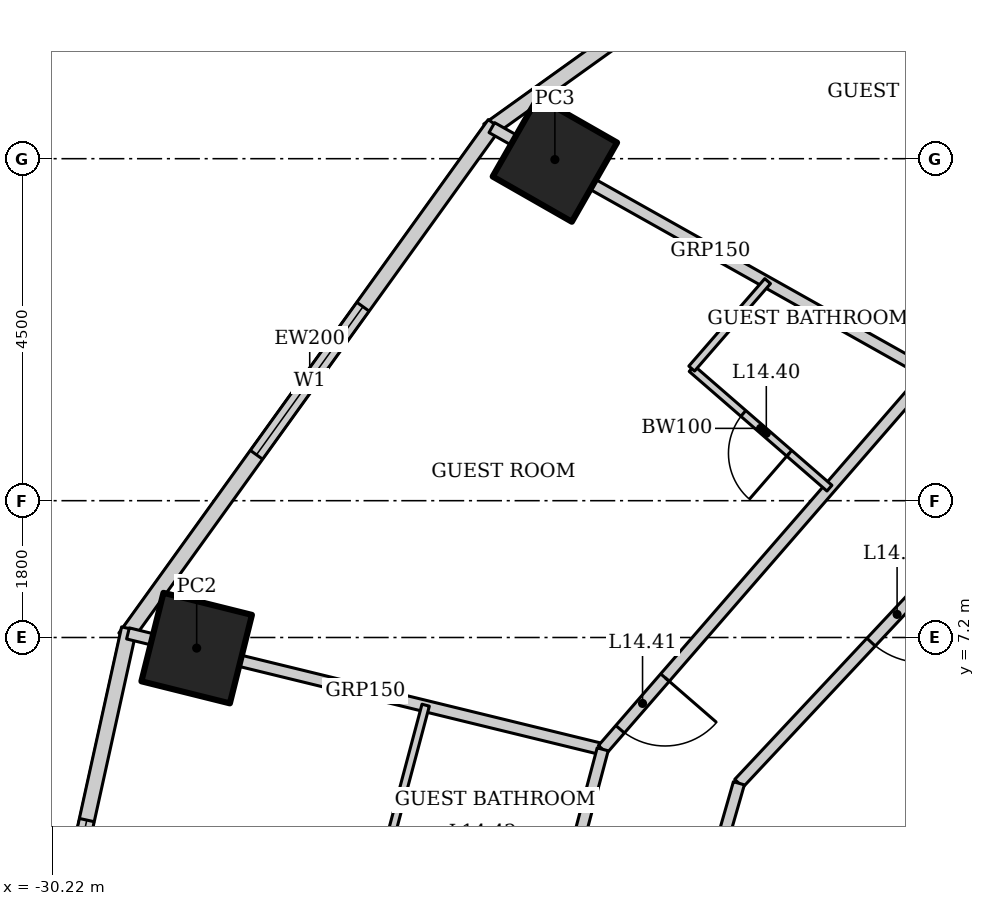
"""IFC4 building model, lengths in metres.
Left out: names, types, materials, properties, quantities, classifications, styles, units other than length and angle.
Written with IfcOpenShell. Run it as: python <this file> out.ifc"""

import sys

from ifc_helpers import new_model, si_unit, direction, frame, frame_2d, origin, origin_2d, place, context, subcontext, project, spatial, rectangle, hollow_rectangle, extrude, element, fill, save


model = new_model("IFC4")
c1 = context("Model", 3, precision=1e-05, world=origin(), true_north=direction((0.0, 1.0)))
c2 = subcontext(c1, "Body", "Model", "MODEL_VIEW")
j1 = project(units=[si_unit("LENGTHUNIT", "METRE"), si_unit("PLANEANGLEUNIT", "RADIAN")], contexts=[c1])
p1 = place(None, origin())
s1 = spatial("IfcSite", under=j1, at=p1, CompositionType="ELEMENT")
p2 = place(p1, origin())
s2 = spatial("IfcBuilding", under=s1, at=p2, CompositionType="ELEMENT")
p3 = place(p2, frame((0.0, 0.0, 65.8)))
s3 = spatial("IfcBuildingStorey", under=s2, at=p3, CompositionType="ELEMENT", Elevation=65.8)
p4 = place(p3, frame((-23.605, 13.489, 0.0), z_axis=(0.0, 0.0, 1.0), x_axis=(0.496139221777, 0.86824298017, 0.0)))
e1 = element("IfcColumn", 1, at=p4, inside=s3, PredefinedType="COLUMN", context=c2, shape_type="SweptSolid", body=[
    extrude(hollow_rectangle(XDim=1.2, YDim=1.2, WallThickness=0.12, at=origin_2d()), origin(), (0.0, 0.0, 1.0), 3.6),
])
p5 = place(p3, frame((-28.318, 7.06, 0.0), z_axis=(0.0, 0.0, 1.0), x_axis=(0.2419218956, 0.970295726276, 0.0)))
e2 = element("IfcColumn", 2, at=p5, inside=s3, PredefinedType="COLUMN", context=c2, shape_type="SweptSolid", body=[
    extrude(hollow_rectangle(XDim=1.2, YDim=1.2, WallThickness=0.1, at=origin_2d()), origin(), (0.0, 0.0, 1.0), 3.6),
])
p6 = place(p3, frame((-17.929, 18.572, 0.0), z_axis=(0.0, 0.0, 1.0), x_axis=(-0.812791321576, -0.582554948112, 0.0)))
e3 = element("IfcWall", 3, at=p6, inside=s3, PredefinedType="SOLIDWALL", context=c2, shape_type="SweptSolid", body=[
    extrude(rectangle(XDim=8.063, YDim=0.2, at=frame_2d((4.032, 0.0))), origin(), (0.0, 0.0, 1.0), 3.4),
])
p7 = place(p6, frame((2.832, 0.0, 0.5)))
e4 = element("IfcOpeningElement", 4, at=p7, cuts=e3, PredefinedType="OPENING", context=c2, shape_type="SweptSolid", body=[
    extrude(rectangle(XDim=2.4, YDim=2.2, at=frame_2d((1.2, 1.1))), frame((0.0, 0.11, 0.0), z_axis=(0.0, -1.0, 0.0), x_axis=(1.0, 0.0, 0.0)), (0.0, 0.0, 1.0), 0.22),
])
p8 = place(p3, frame((-24.4, 13.957, 0.0), z_axis=(0.0, 0.0, 1.0), x_axis=(-0.583937613703, -0.811798536155, 0.0)))
e5 = element("IfcWall", 5, at=p8, inside=s3, PredefinedType="SOLIDWALL", context=c2, shape_type="SweptSolid", body=[
    extrude(rectangle(XDim=8.323, YDim=0.2, at=frame_2d((4.162, 0.0))), origin(), (0.0, 0.0, 1.0), 3.4),
])
p9 = place(p8, frame((2.961, 0.0, 0.5)))
e6 = element("IfcOpeningElement", 6, at=p9, cuts=e5, PredefinedType="OPENING", context=c2, shape_type="SweptSolid", body=[
    extrude(rectangle(XDim=2.4, YDim=2.2, at=frame_2d((1.2, 1.1))), frame((0.0, 0.11, 0.0), z_axis=(0.0, -1.0, 0.0), x_axis=(1.0, 0.0, 0.0)), (0.0, 0.0, 1.0), 0.22),
])
p10 = place(p3, frame((-29.208, 7.318, 0.0), z_axis=(0.0, 0.0, 1.0), x_axis=(-0.215238065514, -0.976561608478, 0.0)))
e7 = element("IfcWall", 7, at=p10, inside=s3, PredefinedType="SOLIDWALL", context=c2, shape_type="SweptSolid", body=[
    extrude(rectangle(XDim=7.562, YDim=0.2, at=frame_2d((3.781, 0.0))), origin(), (0.0, 0.0, 1.0), 3.4),
])
p11 = place(p10, frame((2.581, 0.0, 0.5)))
e8 = element("IfcOpeningElement", 8, at=p11, cuts=e7, PredefinedType="OPENING", context=c2, shape_type="SweptSolid", body=[
    extrude(rectangle(XDim=2.4, YDim=2.2, at=frame_2d((1.2, 1.1))), frame((0.0, 0.11, 0.0), z_axis=(0.0, -1.0, 0.0), x_axis=(1.0, 0.0, 0.0)), (0.0, 0.0, 1.0), 0.22),
])
p12 = place(p3, frame((-24.435, 13.909, 0.0), z_axis=(0.0, 0.0, 1.0), x_axis=(0.871747379892, -0.489955616001, 0.0)))
e9 = element("IfcWall", 9, at=p12, inside=s3, PredefinedType="PARTITIONING", context=c2, shape_type="SweptSolid", body=[
    extrude(rectangle(XDim=6.6, YDim=0.15, at=frame_2d((3.3, 0.0))), origin(), (0.0, 0.0, 1.0), 2.693),
])
p13 = place(p3, frame((-29.222, 7.254, 0.0), z_axis=(0.0, 0.0, 1.0), x_axis=(0.971456980633, -0.237215797913, 0.0)))
e10 = element("IfcWall", 10, at=p13, inside=s3, PredefinedType="PARTITIONING", context=c2, shape_type="SweptSolid", body=[
    extrude(rectangle(XDim=6.429, YDim=0.15, at=frame_2d((3.215, 0.0))), origin(), (0.0, 0.0, 1.0), 2.332),
])
p14 = place(p3, frame((-18.681, 10.675, 0.0), z_axis=(0.0, 0.0, 1.0), x_axis=(-0.655599989166, -0.755108372491, 0.0)))
e11 = element("IfcWall", 11, at=p14, inside=s3, PredefinedType="PARTITIONING", context=c2, shape_type="SweptSolid", body=[
    extrude(rectangle(XDim=6.551, YDim=0.15, at=frame_2d((3.275, 0.0))), origin(), (0.0, 0.0, 1.0), 3.45),
])
p15 = place(p14, frame((5.301, 0.0, 0.0)))
e12 = element("IfcOpeningElement", 12, at=p15, cuts=e11, PredefinedType="OPENING", context=c2, shape_type="SweptSolid", body=[
    extrude(rectangle(XDim=0.9, YDim=2.1, at=frame_2d((0.45, 1.05))), frame((0.0, 0.085, 0.0), z_axis=(0.0, -1.0, 0.0), x_axis=(1.0, 0.0, 0.0)), (0.0, 0.0, 1.0), 0.17),
])
p16 = place(p3, frame((-22.976, 5.729, 0.0), z_axis=(0.0, 0.0, 1.0), x_axis=(-0.257083265334, -0.966389256296, 0.0)))
e13 = element("IfcWall", 13, at=p16, inside=s3, PredefinedType="PARTITIONING", context=c2, shape_type="SweptSolid", body=[
    extrude(rectangle(XDim=5.928, YDim=0.15, at=frame_2d((2.964, 0.0))), origin(), (0.0, 0.0, 1.0), 3.45),
])
p17 = place(p16, frame((4.023, 0.0, 0.0)))
e14 = element("IfcOpeningElement", 14, at=p17, cuts=e13, PredefinedType="OPENING", context=c2, shape_type="SweptSolid", body=[
    extrude(rectangle(XDim=0.9, YDim=2.1, at=frame_2d((0.45, 1.05))), frame((0.0, 0.085, 0.0), z_axis=(0.0, -1.0, 0.0), x_axis=(1.0, 0.0, 0.0)), (0.0, 0.0, 1.0), 0.17),
])
p18 = place(p3, frame((-17.021, 9.726, 0.0), z_axis=(0.0, 0.0, 1.0), x_axis=(-0.68365836236, -0.729802194828, 0.0)))
e15 = element("IfcWall", 15, at=p18, inside=s3, PredefinedType="PARTITIONING", context=c2, shape_type="SweptSolid", body=[
    extrude(rectangle(XDim=6.09, YDim=0.15, at=frame_2d((3.045, 0.0))), origin(), (0.0, 0.0, 1.0), 3.45),
])
p19 = place(p18, frame((2.545, 0.0, 0.0)))
e16 = element("IfcOpeningElement", 16, at=p19, cuts=e15, PredefinedType="OPENING", context=c2, shape_type="SweptSolid", body=[
    extrude(rectangle(XDim=1.0, YDim=2.1, at=frame_2d((0.5, 1.05))), frame((0.0, 0.085, 0.0), z_axis=(0.0, -1.0, 0.0), x_axis=(1.0, 0.0, 0.0)), (0.0, 0.0, 1.0), 0.17),
])
p20 = place(p3, frame((-21.184, 5.282, 0.0), z_axis=(0.0, 0.0, 1.0), x_axis=(-0.27585972825, -0.961197903831, 0.0)))
e17 = element("IfcWall", 17, at=p20, inside=s3, PredefinedType="PARTITIONING", context=c2, shape_type="SweptSolid", body=[
    extrude(rectangle(XDim=4.559, YDim=0.15, at=frame_2d((2.279, 0.0))), origin(), (0.0, 0.0, 1.0), 3.45),
])
p21 = place(p3, frame((-19.993, 9.165, 0.0), z_axis=(0.0, 0.0, 1.0), x_axis=(-0.755098052661, 0.655611875172, 0.0)))
e18 = element("IfcWall", 18, at=p21, inside=s3, PredefinedType="PARTITIONING", context=c2, shape_type="SweptSolid", body=[
    extrude(rectangle(XDim=2.4, YDim=0.1, at=frame_2d((1.2, 0.0))), origin(), (0.0, 0.0, 1.0), 3.45),
])
p22 = place(p21, frame((0.7, 0.0, 0.0)))
e19 = element("IfcOpeningElement", 19, at=p22, cuts=e18, PredefinedType="OPENING", context=c2, shape_type="SweptSolid", body=[
    extrude(rectangle(XDim=0.8, YDim=2.1, at=frame_2d((0.4, 1.05))), frame((0.0, 0.06, 0.0), z_axis=(0.0, -1.0, 0.0), x_axis=(1.0, 0.0, 0.0)), (0.0, 0.0, 1.0), 0.12),
])
p23 = place(p3, frame((-21.805, 10.738, 0.0), z_axis=(0.0, 0.0, 1.0), x_axis=(0.655528024617, 0.755170847518, 0.0)))
e20 = element("IfcWall", 20, at=p23, inside=s3, PredefinedType="PARTITIONING", context=c2, shape_type="SweptSolid", body=[
    extrude(rectangle(XDim=1.524, YDim=0.1, at=frame_2d((0.762, 0.0))), origin(), (0.0, 0.0, 1.0), 3.45),
])
p24 = place(p3, frame((-25.81, 4.413, 0.0), z_axis=(0.0, 0.0, 1.0), x_axis=(0.257143831715, 0.96637314212, 0.0)))
e21 = element("IfcWall", 21, at=p24, inside=s3, PredefinedType="PARTITIONING", context=c2, shape_type="SweptSolid", body=[
    extrude(rectangle(XDim=1.962, YDim=0.1, at=frame_2d((0.981, 0.0))), origin(), (0.0, 0.0, 1.0), 3.45),
])
p25 = place(p9, origin())
e22 = element("IfcWindow", 22, at=p25, inside=s3, PartitioningType="SINGLE_PANEL", PredefinedType="WINDOW", context=c2, shape_type="SweptSolid", body=[
    extrude(rectangle(XDim=2.4, YDim=2.2, at=frame_2d((1.2, 1.1))), frame((0.0, 0.03, 0.0), z_axis=(0.0, -1.0, 0.0), x_axis=(1.0, 0.0, 0.0)), (0.0, 0.0, 1.0), 0.06),
])
fill(e6, e22)
p26 = place(p11, origin())
e23 = element("IfcWindow", 23, at=p26, inside=s3, PartitioningType="SINGLE_PANEL", PredefinedType="WINDOW", context=c2, shape_type="SweptSolid", body=[
    extrude(rectangle(XDim=2.4, YDim=2.2, at=frame_2d((1.2, 1.1))), frame((0.0, 0.03, 0.0), z_axis=(0.0, -1.0, 0.0), x_axis=(1.0, 0.0, 0.0)), (0.0, 0.0, 1.0), 0.06),
])
fill(e8, e23)
p27 = place(p19, origin())
e24 = element("IfcDoor", 24, at=p27, inside=s3, OperationType="SINGLE_SWING_LEFT", PredefinedType="DOOR", context=c2, shape_type="SweptSolid", body=[
    extrude(rectangle(XDim=1.0, YDim=2.1, at=frame_2d((0.5, 1.05))), frame((0.0, 0.025, 0.0), z_axis=(0.0, -1.0, 0.0), x_axis=(1.0, 0.0, 0.0)), (0.0, 0.0, 1.0), 0.05),
])
fill(e16, e24)
p28 = place(p22, origin())
e25 = element("IfcDoor", 25, at=p28, inside=s3, OperationType="SINGLE_SWING_LEFT", PredefinedType="DOOR", context=c2, shape_type="SweptSolid", body=[
    extrude(rectangle(XDim=0.8, YDim=2.1, at=frame_2d((0.4, 1.05))), frame((0.0, 0.025, 0.0), z_axis=(0.0, -1.0, 0.0), x_axis=(1.0, 0.0, 0.0)), (0.0, 0.0, 1.0), 0.05),
])
fill(e19, e25)
p29 = place(p15, origin())
e26 = element("IfcDoor", 26, at=p29, inside=s3, OperationType="SINGLE_SWING_LEFT", PredefinedType="DOOR", context=c2, shape_type="SweptSolid", body=[
    extrude(rectangle(XDim=0.9, YDim=2.1, at=frame_2d((0.45, 1.05))), frame((0.0, 0.025, 0.0), z_axis=(0.0, -1.0, 0.0), x_axis=(1.0, 0.0, 0.0)), (0.0, 0.0, 1.0), 0.05),
])
fill(e12, e26)
save(model, sys.argv[1])
